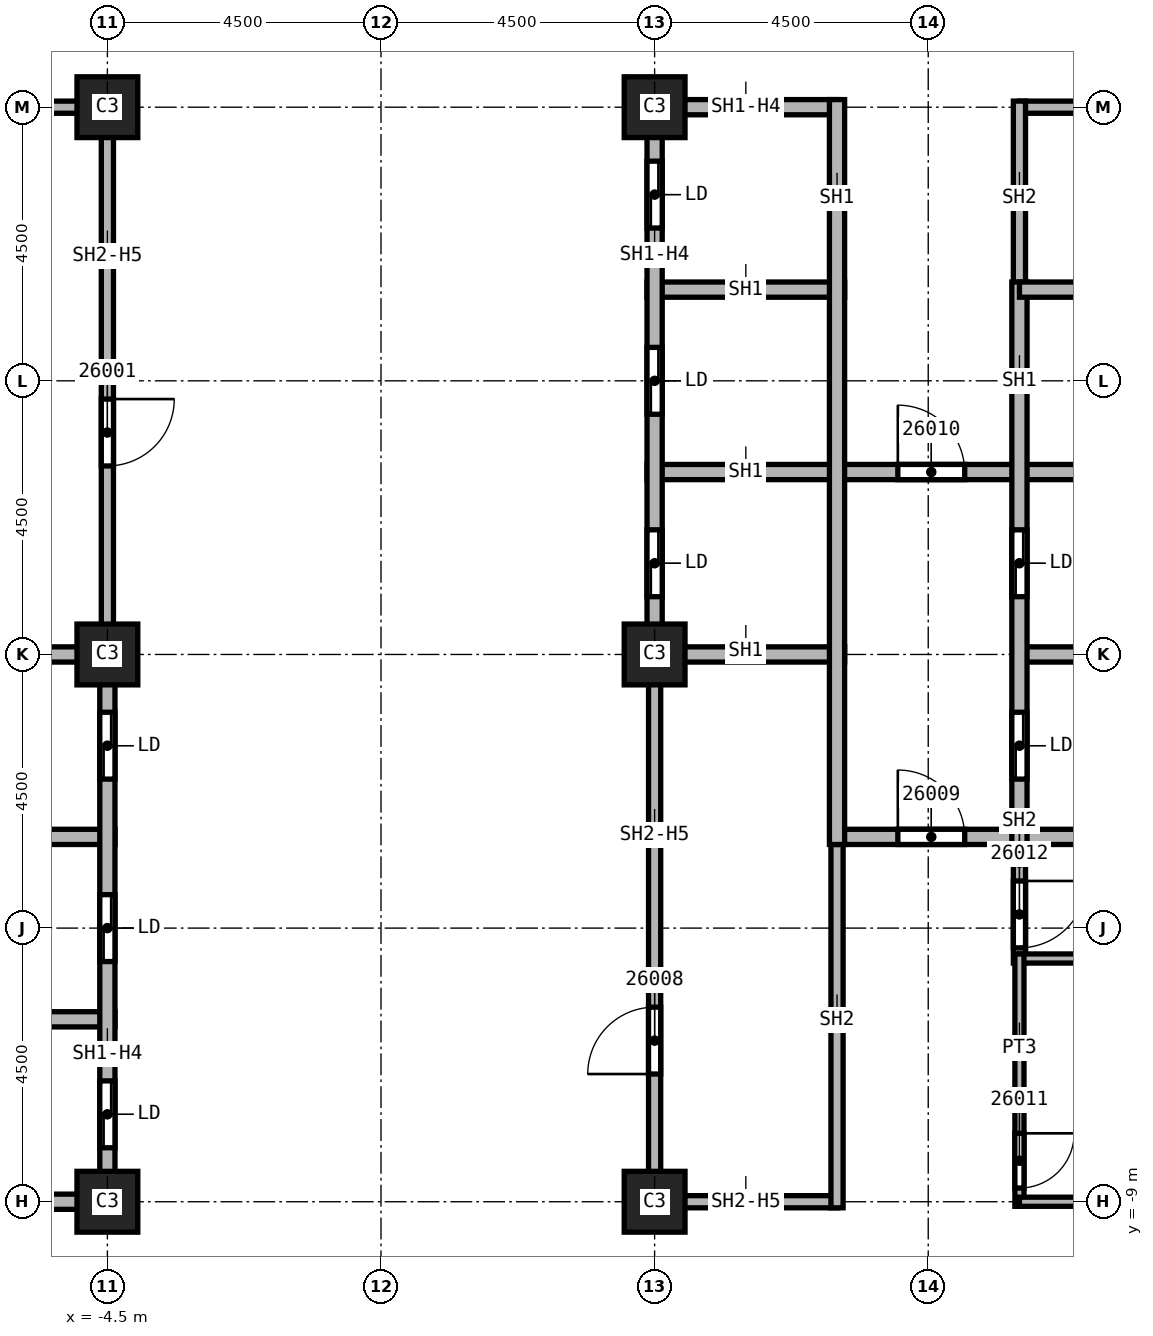
"""IFC4 building model, lengths in metres.
Left out: names, types, materials, properties, quantities, classifications, styles, units other than length and angle.
Written with IfcOpenShell. Run it as: python <this file> out.ifc"""

import sys

from ifc_helpers import new_model, si_unit, direction, frame, frame_2d, origin, origin_2d, place, context, subcontext, project, spatial, rectangle, extrude, element, fill, save


model = new_model("IFC4")
c1 = context("Model", 3, precision=1e-05, world=origin(), true_north=direction((0.0, 1.0)))
c2 = subcontext(c1, "Body", "Model", "MODEL_VIEW")
j1 = project(units=[si_unit("LENGTHUNIT", "METRE"), si_unit("PLANEANGLEUNIT", "RADIAN")], contexts=[c1])
p1 = place(None, origin())
s1 = spatial("IfcSite", under=j1, at=p1, CompositionType="ELEMENT")
p2 = place(p1, origin())
s2 = spatial("IfcBuilding", under=s1, at=p2, CompositionType="ELEMENT")
p3 = place(p2, frame((0.0, 0.0, 120.0)))
s3 = spatial("IfcBuildingStorey", under=s2, at=p3, CompositionType="ELEMENT", Elevation=120.0)
for number, where, z_axis, x_axis in (
    (1, (4.5, 0.0, 0.0), (0.0, 0.0, 1.0), (1.0, 0.0, 0.0)),
    (2, (4.5, 9.0, 0.0), (0.0, 0.0, 1.0), (1.0, 0.0, 0.0)),
    (3, (4.5, -9.0, 0.0), (0.0, 0.0, 1.0), (1.0, 0.0, 0.0)),
    (4, (-4.5, 0.0, 0.0), (0.0, 0.0, 1.0), (1.0, 0.0, 0.0)),
    (5, (-4.5, 9.0, 0.0), (0.0, 0.0, 1.0), (1.0, 0.0, 0.0)),
    (6, (-4.5, -9.0, 0.0), (0.0, 0.0, 1.0), (1.0, 0.0, 0.0)),
):
    element("IfcColumn", number, at=place(p3, frame(where, z_axis=z_axis, x_axis=x_axis)), inside=s3, PredefinedType="COLUMN", context=c2, shape_type="SweptSolid", body=[
        extrude(rectangle(XDim=1.0, YDim=1.0, at=origin_2d()), origin(), (0.0, 0.0, 1.0), 5.7),
    ])
p4 = place(p3, frame((-7.5, 9.0, 0.0), z_axis=(0.0, 0.0, 1.0), x_axis=(1.0, 0.0, 0.0)))
e7 = element("IfcWall", 7, at=p4, inside=s3, PredefinedType="SOLIDWALL", context=c2, shape_type="SweptSolid", body=[
    extrude(rectangle(XDim=3.0, YDim=0.2, at=frame_2d((1.5, 0.0))), origin(), (0.0, 0.0, 1.0), 4.938),
])
p5 = place(p3, frame((-4.5, 9.1, 0.0), z_axis=(0.0, 0.0, 1.0), x_axis=(0.0, -1.0, 0.0)))
e8 = element("IfcWall", 8, at=p5, inside=s3, PredefinedType="SOLIDWALL", context=c2, shape_type="SweptSolid", body=[
    extrude(rectangle(XDim=9.1, YDim=0.2, at=frame_2d((4.55, 0.0))), origin(), (0.0, 0.0, 1.0), 4.938),
])
p6 = place(p5, frame((4.9, 0.0, 0.0)))
e9 = element("IfcOpeningElement", 9, at=p6, cuts=e8, PredefinedType="OPENING", context=c2, shape_type="SweptSolid", body=[
    extrude(rectangle(XDim=1.1, YDim=2.1, at=frame_2d((0.55, 1.05))), frame((0.0, 0.1, 0.0), z_axis=(0.0, -1.0, 0.0), x_axis=(1.0, 0.0, 0.0)), (0.0, 0.0, 1.0), 0.2),
])
p7 = place(p3, frame((4.5, -9.1, 0.0), z_axis=(0.0, 0.0, 1.0), x_axis=(0.0, 1.0, 0.0)))
e10 = element("IfcWall", 10, at=p7, inside=s3, PredefinedType="SOLIDWALL", context=c2, shape_type="SweptSolid", body=[
    extrude(rectangle(XDim=9.1, YDim=0.2, at=frame_2d((4.55, 0.0))), origin(), (0.0, 0.0, 1.0), 4.938),
])
p8 = place(p7, frame((2.2, 0.0, 0.0)))
e11 = element("IfcOpeningElement", 11, at=p8, cuts=e10, PredefinedType="OPENING", context=c2, shape_type="SweptSolid", body=[
    extrude(rectangle(XDim=1.1, YDim=2.1, at=frame_2d((0.55, 1.05))), frame((0.0, 0.1, 0.0), z_axis=(0.0, -1.0, 0.0), x_axis=(1.0, 0.0, 0.0)), (0.0, 0.0, 1.0), 0.2),
])
p9 = place(p3, frame((7.5, -9.0, 0.0), z_axis=(0.0, 0.0, 1.0), x_axis=(-1.0, 0.0, 0.0)))
e12 = element("IfcWall", 12, at=p9, inside=s3, PredefinedType="SOLIDWALL", context=c2, shape_type="SweptSolid", body=[
    extrude(rectangle(XDim=3.0, YDim=0.2, at=frame_2d((1.5, 0.0))), origin(), (0.0, 0.0, 1.0), 4.938),
])
p10 = place(p3, frame((7.5, -2.875, 0.0), z_axis=(0.0, 0.0, 1.0), x_axis=(0.0, -1.0, 0.0)))
e13 = element("IfcWall", 13, at=p10, inside=s3, PredefinedType="SOLIDWALL", context=c2, shape_type="SweptSolid", body=[
    extrude(rectangle(XDim=6.225, YDim=0.2, at=frame_2d((3.113, 0.0))), origin(), (0.0, 0.0, 1.0), 5.7),
])
p11 = place(p3, frame((10.5, -2.875, 0.0), z_axis=(0.0, 0.0, 1.0), x_axis=(0.0, -1.0, 0.0)))
e14 = element("IfcWall", 14, at=p11, inside=s3, PredefinedType="SOLIDWALL", context=c2, shape_type="SweptSolid", body=[
    extrude(rectangle(XDim=2.2, YDim=0.2, at=frame_2d((1.1, 0.0))), origin(), (0.0, 0.0, 1.0), 5.7),
])
p12 = place(p11, frame((0.85, 0.0, 0.0)))
e15 = element("IfcOpeningElement", 15, at=p12, cuts=e14, PredefinedType="OPENING", context=c2, shape_type="SweptSolid", body=[
    extrude(rectangle(XDim=1.1, YDim=2.1, at=frame_2d((0.55, 1.05))), frame((0.0, 0.1, 0.0), z_axis=(0.0, -1.0, 0.0), x_axis=(1.0, 0.0, 0.0)), (0.0, 0.0, 1.0), 0.2),
])
p13 = place(p3, frame((10.5, 9.0, 0.0), z_axis=(0.0, 0.0, 1.0), x_axis=(1.0, 0.0, 0.0)))
e16 = element("IfcWall", 16, at=p13, inside=s3, PredefinedType="SOLIDWALL", context=c2, shape_type="SweptSolid", body=[
    extrude(rectangle(XDim=3.0, YDim=0.2, at=frame_2d((1.5, 0.0))), origin(), (0.0, 0.0, 1.0), 4.938),
])
p14 = place(p3, frame((10.5, 9.1, 0.0), z_axis=(0.0, 0.0, 1.0), x_axis=(0.0, -1.0, 0.0)))
e17 = element("IfcWall", 17, at=p14, inside=s3, PredefinedType="SOLIDWALL", context=c2, shape_type="SweptSolid", body=[
    extrude(rectangle(XDim=3.225, YDim=0.2, at=frame_2d((1.613, 0.0))), origin(), (0.0, 0.0, 1.0), 5.7),
])
p15 = place(p3, frame((-13.625, -3.0, 0.0), z_axis=(0.0, 0.0, 1.0), x_axis=(1.0, 0.0, 0.0)))
e18 = element("IfcWall", 18, at=p15, inside=s3, PredefinedType="SOLIDWALL", context=c2, shape_type="SweptSolid", body=[
    extrude(rectangle(XDim=9.25, YDim=0.25, at=frame_2d((4.625, 0.0))), origin(), (0.0, 0.0, 1.0), 5.7),
])
p16 = place(p15, frame((3.25, 0.0, 0.0)))
e19 = element("IfcOpeningElement", 19, at=p16, cuts=e18, PredefinedType="OPENING", context=c2, shape_type="SweptSolid", body=[
    extrude(rectangle(XDim=1.1, YDim=2.1, at=frame_2d((0.55, 1.05))), frame((0.0, 0.125, 0.0), z_axis=(0.0, -1.0, 0.0), x_axis=(1.0, 0.0, 0.0)), (0.0, 0.0, 1.0), 0.25),
])
for number, where, z_axis, x_axis in (
    (20, (-7.625, -6.0, 0.0), (0.0, 0.0, 1.0), (1.0, 0.0, 0.0)),
    (21, (-7.625, 0.0, 0.0), (0.0, 0.0, 1.0), (1.0, 0.0, 0.0)),
):
    element("IfcWall", number, at=place(p3, frame(where, z_axis=z_axis, x_axis=x_axis)), inside=s3, PredefinedType="SOLIDWALL", context=c2, shape_type="SweptSolid", body=[
        extrude(rectangle(XDim=3.25, YDim=0.25, at=frame_2d((1.625, 0.0))), origin(), (0.0, 0.0, 1.0), 5.7),
    ])
p17 = place(p3, frame((-4.5, -9.0, 0.0), z_axis=(0.0, 0.0, 1.0), x_axis=(-1.0, 0.0, 0.0)))
e22 = element("IfcWall", 22, at=p17, inside=s3, PredefinedType="SOLIDWALL", context=c2, shape_type="SweptSolid", body=[
    extrude(rectangle(XDim=3.0, YDim=0.25, at=frame_2d((1.5, 0.0))), origin(), (0.0, 0.0, 1.0), 4.938),
])
p18 = place(p3, frame((-4.5, 0.0, 0.0), z_axis=(0.0, 0.0, 1.0), x_axis=(0.0, -1.0, 0.0)))
e23 = element("IfcWall", 23, at=p18, inside=s3, PredefinedType="SOLIDWALL", context=c2, shape_type="SweptSolid", body=[
    extrude(rectangle(XDim=9.125, YDim=0.25, at=frame_2d((4.562, 0.0))), origin(), (0.0, 0.0, 1.0), 4.938),
])
p19 = place(p18, frame((7.012, 0.0, 0.0)))
e24 = element("IfcOpeningElement", 24, at=p19, cuts=e23, PredefinedType="OPENING", context=c2, shape_type="SweptSolid", body=[
    extrude(rectangle(XDim=1.1, YDim=2.1, at=frame_2d((0.55, 1.05))), frame((0.0, 0.125, 0.0), z_axis=(0.0, -1.0, 0.0), x_axis=(1.0, 0.0, 0.0)), (0.0, 0.0, 1.0), 0.25),
])
p20 = place(p18, frame((3.95, 0.0, 0.0)))
e25 = element("IfcOpeningElement", 25, at=p20, cuts=e23, PredefinedType="OPENING", context=c2, shape_type="SweptSolid", body=[
    extrude(rectangle(XDim=1.1, YDim=2.1, at=frame_2d((0.55, 1.05))), frame((0.0, 0.125, 0.0), z_axis=(0.0, -1.0, 0.0), x_axis=(1.0, 0.0, 0.0)), (0.0, 0.0, 1.0), 0.25),
])
p21 = place(p18, frame((0.95, 0.0, 0.0)))
e26 = element("IfcOpeningElement", 26, at=p21, cuts=e23, PredefinedType="OPENING", context=c2, shape_type="SweptSolid", body=[
    extrude(rectangle(XDim=1.1, YDim=2.1, at=frame_2d((0.55, 1.05))), frame((0.0, 0.125, 0.0), z_axis=(0.0, -1.0, 0.0), x_axis=(1.0, 0.0, 0.0)), (0.0, 0.0, 1.0), 0.25),
])
p22 = place(p3, frame((4.375, 0.0, 0.0), z_axis=(0.0, 0.0, 1.0), x_axis=(1.0, 0.0, 0.0)))
e27 = element("IfcWall", 27, at=p22, inside=s3, PredefinedType="SOLIDWALL", context=c2, shape_type="SweptSolid", body=[
    extrude(rectangle(XDim=3.25, YDim=0.25, at=frame_2d((1.625, 0.0))), origin(), (0.0, 0.0, 1.0), 5.7),
])
p23 = place(p3, frame((4.375, 3.0, 0.0), z_axis=(0.0, 0.0, 1.0), x_axis=(1.0, 0.0, 0.0)))
e28 = element("IfcWall", 28, at=p23, inside=s3, PredefinedType="SOLIDWALL", context=c2, shape_type="SweptSolid", body=[
    extrude(rectangle(XDim=9.25, YDim=0.25, at=frame_2d((4.625, 0.0))), origin(), (0.0, 0.0, 1.0), 5.7),
])
p24 = place(p23, frame((4.125, 0.0, 0.0)))
e29 = element("IfcOpeningElement", 29, at=p24, cuts=e28, PredefinedType="OPENING", context=c2, shape_type="SweptSolid", body=[
    extrude(rectangle(XDim=1.1, YDim=2.1, at=frame_2d((0.55, 1.05))), frame((0.0, 0.125, 0.0), z_axis=(0.0, -1.0, 0.0), x_axis=(1.0, 0.0, 0.0)), (0.0, 0.0, 1.0), 0.25),
])
p25 = place(p3, frame((4.375, 6.0, 0.0), z_axis=(0.0, 0.0, 1.0), x_axis=(1.0, 0.0, 0.0)))
e30 = element("IfcWall", 30, at=p25, inside=s3, PredefinedType="SOLIDWALL", context=c2, shape_type="SweptSolid", body=[
    extrude(rectangle(XDim=3.25, YDim=0.25, at=frame_2d((1.625, 0.0))), origin(), (0.0, 0.0, 1.0), 5.7),
])
p26 = place(p3, frame((4.5, 0.0, 0.0), z_axis=(0.0, 0.0, 1.0), x_axis=(0.0, 1.0, 0.0)))
e31 = element("IfcWall", 31, at=p26, inside=s3, PredefinedType="SOLIDWALL", context=c2, shape_type="SweptSolid", body=[
    extrude(rectangle(XDim=9.125, YDim=0.25, at=frame_2d((4.562, 0.0))), origin(), (0.0, 0.0, 1.0), 4.938),
])
p27 = place(p26, frame((0.95, 0.0, 0.0)))
e32 = element("IfcOpeningElement", 32, at=p27, cuts=e31, PredefinedType="OPENING", context=c2, shape_type="SweptSolid", body=[
    extrude(rectangle(XDim=1.1, YDim=2.1, at=frame_2d((0.55, 1.05))), frame((0.0, 0.125, 0.0), z_axis=(0.0, -1.0, 0.0), x_axis=(1.0, 0.0, 0.0)), (0.0, 0.0, 1.0), 0.25),
])
p28 = place(p26, frame((3.95, 0.0, 0.0)))
e33 = element("IfcOpeningElement", 33, at=p28, cuts=e31, PredefinedType="OPENING", context=c2, shape_type="SweptSolid", body=[
    extrude(rectangle(XDim=1.1, YDim=2.1, at=frame_2d((0.55, 1.05))), frame((0.0, 0.125, 0.0), z_axis=(0.0, -1.0, 0.0), x_axis=(1.0, 0.0, 0.0)), (0.0, 0.0, 1.0), 0.25),
])
p29 = place(p26, frame((7.012, 0.0, 0.0)))
e34 = element("IfcOpeningElement", 34, at=p29, cuts=e31, PredefinedType="OPENING", context=c2, shape_type="SweptSolid", body=[
    extrude(rectangle(XDim=1.1, YDim=2.1, at=frame_2d((0.55, 1.05))), frame((0.0, 0.125, 0.0), z_axis=(0.0, -1.0, 0.0), x_axis=(1.0, 0.0, 0.0)), (0.0, 0.0, 1.0), 0.25),
])
p30 = place(p3, frame((4.5, 9.0, 0.0), z_axis=(0.0, 0.0, 1.0), x_axis=(1.0, 0.0, 0.0)))
e35 = element("IfcWall", 35, at=p30, inside=s3, PredefinedType="SOLIDWALL", context=c2, shape_type="SweptSolid", body=[
    extrude(rectangle(XDim=3.0, YDim=0.25, at=frame_2d((1.5, 0.0))), origin(), (0.0, 0.0, 1.0), 4.938),
])
p31 = place(p3, frame((7.5, -3.0, 0.0), z_axis=(0.0, 0.0, 1.0), x_axis=(1.0, 0.0, 0.0)))
e36 = element("IfcWall", 36, at=p31, inside=s3, PredefinedType="SOLIDWALL", context=c2, shape_type="SweptSolid", body=[
    extrude(rectangle(XDim=6.125, YDim=0.25, at=frame_2d((3.062, 0.0))), origin(), (0.0, 0.0, 1.0), 5.7),
])
p32 = place(p31, frame((1.0, 0.0, 0.0)))
e37 = element("IfcOpeningElement", 37, at=p32, cuts=e36, PredefinedType="OPENING", context=c2, shape_type="SweptSolid", body=[
    extrude(rectangle(XDim=1.1, YDim=2.1, at=frame_2d((0.55, 1.05))), frame((0.0, 0.125, 0.0), z_axis=(0.0, -1.0, 0.0), x_axis=(1.0, 0.0, 0.0)), (0.0, 0.0, 1.0), 0.25),
])
p33 = place(p3, frame((7.5, 9.125, 0.0), z_axis=(0.0, 0.0, 1.0), x_axis=(0.0, -1.0, 0.0)))
e38 = element("IfcWall", 38, at=p33, inside=s3, PredefinedType="SOLIDWALL", context=c2, shape_type="SweptSolid", body=[
    extrude(rectangle(XDim=12.25, YDim=0.25, at=frame_2d((6.125, 0.0))), origin(), (0.0, 0.0, 1.0), 5.7),
])
p34 = place(p3, frame((10.5, 0.0, 0.0), z_axis=(0.0, 0.0, 1.0), x_axis=(1.0, 0.0, 0.0)))
e39 = element("IfcWall", 39, at=p34, inside=s3, PredefinedType="SOLIDWALL", context=c2, shape_type="SweptSolid", body=[
    extrude(rectangle(XDim=3.125, YDim=0.25, at=frame_2d((1.562, 0.0))), origin(), (0.0, 0.0, 1.0), 5.7),
])
p35 = place(p3, frame((10.5, 6.125, 0.0), z_axis=(0.0, 0.0, 1.0), x_axis=(0.0, -1.0, 0.0)))
e40 = element("IfcWall", 40, at=p35, inside=s3, PredefinedType="SOLIDWALL", context=c2, shape_type="SweptSolid", body=[
    extrude(rectangle(XDim=9.25, YDim=0.25, at=frame_2d((4.625, 0.0))), origin(), (0.0, 0.0, 1.0), 5.7),
])
p36 = place(p35, frame((7.075, 0.0, 0.0)))
e41 = element("IfcOpeningElement", 41, at=p36, cuts=e40, PredefinedType="OPENING", context=c2, shape_type="SweptSolid", body=[
    extrude(rectangle(XDim=1.1, YDim=2.1, at=frame_2d((0.55, 1.05))), frame((0.0, 0.125, 0.0), z_axis=(0.0, -1.0, 0.0), x_axis=(1.0, 0.0, 0.0)), (0.0, 0.0, 1.0), 0.25),
])
p37 = place(p35, frame((4.075, 0.0, 0.0)))
e42 = element("IfcOpeningElement", 42, at=p37, cuts=e40, PredefinedType="OPENING", context=c2, shape_type="SweptSolid", body=[
    extrude(rectangle(XDim=1.1, YDim=2.1, at=frame_2d((0.55, 1.05))), frame((0.0, 0.125, 0.0), z_axis=(0.0, -1.0, 0.0), x_axis=(1.0, 0.0, 0.0)), (0.0, 0.0, 1.0), 0.25),
])
p38 = place(p3, frame((10.5, 6.0, 0.0), z_axis=(0.0, 0.0, 1.0), x_axis=(1.0, 0.0, 0.0)))
e43 = element("IfcWall", 43, at=p38, inside=s3, PredefinedType="SOLIDWALL", context=c2, shape_type="SweptSolid", body=[
    extrude(rectangle(XDim=3.125, YDim=0.25, at=frame_2d((1.562, 0.0))), origin(), (0.0, 0.0, 1.0), 5.7),
])
p39 = place(p3, frame((10.5, -5.0, 0.0), z_axis=(0.0, 0.0, 1.0), x_axis=(1.0, 0.0, 0.0)))
e44 = element("IfcWall", 44, at=p39, inside=s3, PredefinedType="PARTITIONING", context=c2, shape_type="SweptSolid", body=[
    extrude(rectangle(XDim=3.1, YDim=0.15, at=frame_2d((1.55, 0.0))), origin(), (0.0, 0.0, 1.0), 5.7),
])
p40 = place(p3, frame((10.5, -4.925, 0.0), z_axis=(0.0, 0.0, 1.0), x_axis=(0.0, -1.0, 0.0)))
e45 = element("IfcWall", 45, at=p40, inside=s3, PredefinedType="PARTITIONING", context=c2, shape_type="SweptSolid", body=[
    extrude(rectangle(XDim=4.15, YDim=0.15, at=frame_2d((2.075, 0.0))), origin(), (0.0, 0.0, 1.0), 5.7),
])
p41 = place(p40, frame((2.95, 0.0, 0.0)))
e46 = element("IfcOpeningElement", 46, at=p41, cuts=e45, PredefinedType="OPENING", context=c2, shape_type="SweptSolid", body=[
    extrude(rectangle(XDim=0.9, YDim=2.1, at=frame_2d((0.45, 1.05))), frame((0.0, 0.075, 0.0), z_axis=(0.0, -1.0, 0.0), x_axis=(1.0, 0.0, 0.0)), (0.0, 0.0, 1.0), 0.15),
])
p42 = place(p3, frame((13.5, -9.0, 0.0), z_axis=(0.0, 0.0, 1.0), x_axis=(-1.0, 0.0, 0.0)))
e47 = element("IfcWall", 47, at=p42, inside=s3, PredefinedType="PARTITIONING", context=c2, shape_type="SweptSolid", body=[
    extrude(rectangle(XDim=3.0, YDim=0.15, at=frame_2d((1.5, 0.0))), origin(), (0.0, 0.0, 1.0), 4.938),
])
p43 = place(p6, origin())
e48 = element("IfcDoor", 48, at=p43, inside=s3, OperationType="SINGLE_SWING_RIGHT", PredefinedType="DOOR", context=c2, shape_type="SweptSolid", body=[
    extrude(rectangle(XDim=1.1, YDim=2.1, at=frame_2d((0.55, 1.05))), frame((0.0, 0.025, 0.0), z_axis=(0.0, -1.0, 0.0), x_axis=(1.0, 0.0, 0.0)), (0.0, 0.0, 1.0), 0.05),
])
fill(e9, e48)
p44 = place(p8, origin())
e49 = element("IfcDoor", 49, at=p44, inside=s3, OperationType="SINGLE_SWING_LEFT", PredefinedType="DOOR", context=c2, shape_type="SweptSolid", body=[
    extrude(rectangle(XDim=1.1, YDim=2.1, at=frame_2d((0.55, 1.05))), frame((0.0, 0.025, 0.0), z_axis=(0.0, -1.0, 0.0), x_axis=(1.0, 0.0, 0.0)), (0.0, 0.0, 1.0), 0.05),
])
fill(e11, e49)
p45 = place(p32, origin())
e50 = element("IfcDoor", 50, at=p45, inside=s3, OperationType="SINGLE_SWING_RIGHT", PredefinedType="DOOR", context=c2, shape_type="SweptSolid", body=[
    extrude(rectangle(XDim=1.1, YDim=2.1, at=frame_2d((0.55, 1.05))), frame((0.0, 0.025, 0.0), z_axis=(0.0, -1.0, 0.0), x_axis=(1.0, 0.0, 0.0)), (0.0, 0.0, 1.0), 0.05),
])
fill(e37, e50)
p46 = place(p24, origin())
e51 = element("IfcDoor", 51, at=p46, inside=s3, OperationType="SINGLE_SWING_LEFT", PredefinedType="DOOR", context=c2, shape_type="SweptSolid", body=[
    extrude(rectangle(XDim=1.1, YDim=2.1, at=frame_2d((0.55, 1.05))), frame((0.0, 0.025, 0.0), z_axis=(0.0, -1.0, 0.0), x_axis=(1.0, 0.0, 0.0)), (0.0, 0.0, 1.0), 0.05),
])
fill(e29, e51)
p47 = place(p41, origin())
e52 = element("IfcDoor", 52, at=p47, inside=s3, OperationType="SINGLE_SWING_RIGHT", PredefinedType="DOOR", context=c2, shape_type="SweptSolid", body=[
    extrude(rectangle(XDim=0.9, YDim=2.1, at=frame_2d((0.45, 1.05))), frame((0.0, 0.025, 0.0), z_axis=(0.0, -1.0, 0.0), x_axis=(1.0, 0.0, 0.0)), (0.0, 0.0, 1.0), 0.05),
])
fill(e46, e52)
p48 = place(p12, origin())
e53 = element("IfcDoor", 53, at=p48, inside=s3, OperationType="SINGLE_SWING_LEFT", PredefinedType="DOOR", context=c2, shape_type="SweptSolid", body=[
    extrude(rectangle(XDim=1.1, YDim=2.1, at=frame_2d((0.55, 1.05))), frame((0.0, 0.025, 0.0), z_axis=(0.0, -1.0, 0.0), x_axis=(1.0, 0.0, 0.0)), (0.0, 0.0, 1.0), 0.05),
])
fill(e15, e53)
p49 = place(p19, origin())
e54 = element("IfcDoor", 54, at=p49, inside=s3, OperationType="SLIDING_TO_LEFT", PredefinedType="DOOR", context=c2, shape_type="SweptSolid", body=[
    extrude(rectangle(XDim=1.1, YDim=2.1, at=frame_2d((0.55, 1.05))), frame((0.0, 0.025, 0.0), z_axis=(0.0, -1.0, 0.0), x_axis=(1.0, 0.0, 0.0)), (0.0, 0.0, 1.0), 0.05),
])
fill(e24, e54)
p50 = place(p20, origin())
e55 = element("IfcDoor", 55, at=p50, inside=s3, OperationType="SLIDING_TO_LEFT", PredefinedType="DOOR", context=c2, shape_type="SweptSolid", body=[
    extrude(rectangle(XDim=1.1, YDim=2.1, at=frame_2d((0.55, 1.05))), frame((0.0, 0.025, 0.0), z_axis=(0.0, -1.0, 0.0), x_axis=(1.0, 0.0, 0.0)), (0.0, 0.0, 1.0), 0.05),
])
fill(e25, e55)
p51 = place(p21, origin())
e56 = element("IfcDoor", 56, at=p51, inside=s3, OperationType="SLIDING_TO_LEFT", PredefinedType="DOOR", context=c2, shape_type="SweptSolid", body=[
    extrude(rectangle(XDim=1.1, YDim=2.1, at=frame_2d((0.55, 1.05))), frame((0.0, 0.025, 0.0), z_axis=(0.0, -1.0, 0.0), x_axis=(1.0, 0.0, 0.0)), (0.0, 0.0, 1.0), 0.05),
])
fill(e26, e56)
p52 = place(p27, origin())
e57 = element("IfcDoor", 57, at=p52, inside=s3, OperationType="SLIDING_TO_LEFT", PredefinedType="DOOR", context=c2, shape_type="SweptSolid", body=[
    extrude(rectangle(XDim=1.1, YDim=2.1, at=frame_2d((0.55, 1.05))), frame((0.0, 0.025, 0.0), z_axis=(0.0, -1.0, 0.0), x_axis=(1.0, 0.0, 0.0)), (0.0, 0.0, 1.0), 0.05),
])
fill(e32, e57)
p53 = place(p28, origin())
e58 = element("IfcDoor", 58, at=p53, inside=s3, OperationType="SLIDING_TO_LEFT", PredefinedType="DOOR", context=c2, shape_type="SweptSolid", body=[
    extrude(rectangle(XDim=1.1, YDim=2.1, at=frame_2d((0.55, 1.05))), frame((0.0, 0.025, 0.0), z_axis=(0.0, -1.0, 0.0), x_axis=(1.0, 0.0, 0.0)), (0.0, 0.0, 1.0), 0.05),
])
fill(e33, e58)
p54 = place(p29, origin())
e59 = element("IfcDoor", 59, at=p54, inside=s3, OperationType="SLIDING_TO_LEFT", PredefinedType="DOOR", context=c2, shape_type="SweptSolid", body=[
    extrude(rectangle(XDim=1.1, YDim=2.1, at=frame_2d((0.55, 1.05))), frame((0.0, 0.025, 0.0), z_axis=(0.0, -1.0, 0.0), x_axis=(1.0, 0.0, 0.0)), (0.0, 0.0, 1.0), 0.05),
])
fill(e34, e59)
p55 = place(p36, origin())
e60 = element("IfcDoor", 60, at=p55, inside=s3, OperationType="SLIDING_TO_LEFT", PredefinedType="DOOR", context=c2, shape_type="SweptSolid", body=[
    extrude(rectangle(XDim=1.1, YDim=2.1, at=frame_2d((0.55, 1.05))), frame((0.0, 0.025, 0.0), z_axis=(0.0, -1.0, 0.0), x_axis=(1.0, 0.0, 0.0)), (0.0, 0.0, 1.0), 0.05),
])
fill(e41, e60)
p56 = place(p37, origin())
e61 = element("IfcDoor", 61, at=p56, inside=s3, OperationType="SLIDING_TO_LEFT", PredefinedType="DOOR", context=c2, shape_type="SweptSolid", body=[
    extrude(rectangle(XDim=1.1, YDim=2.1, at=frame_2d((0.55, 1.05))), frame((0.0, 0.025, 0.0), z_axis=(0.0, -1.0, 0.0), x_axis=(1.0, 0.0, 0.0)), (0.0, 0.0, 1.0), 0.05),
])
fill(e42, e61)
save(model, sys.argv[1])
